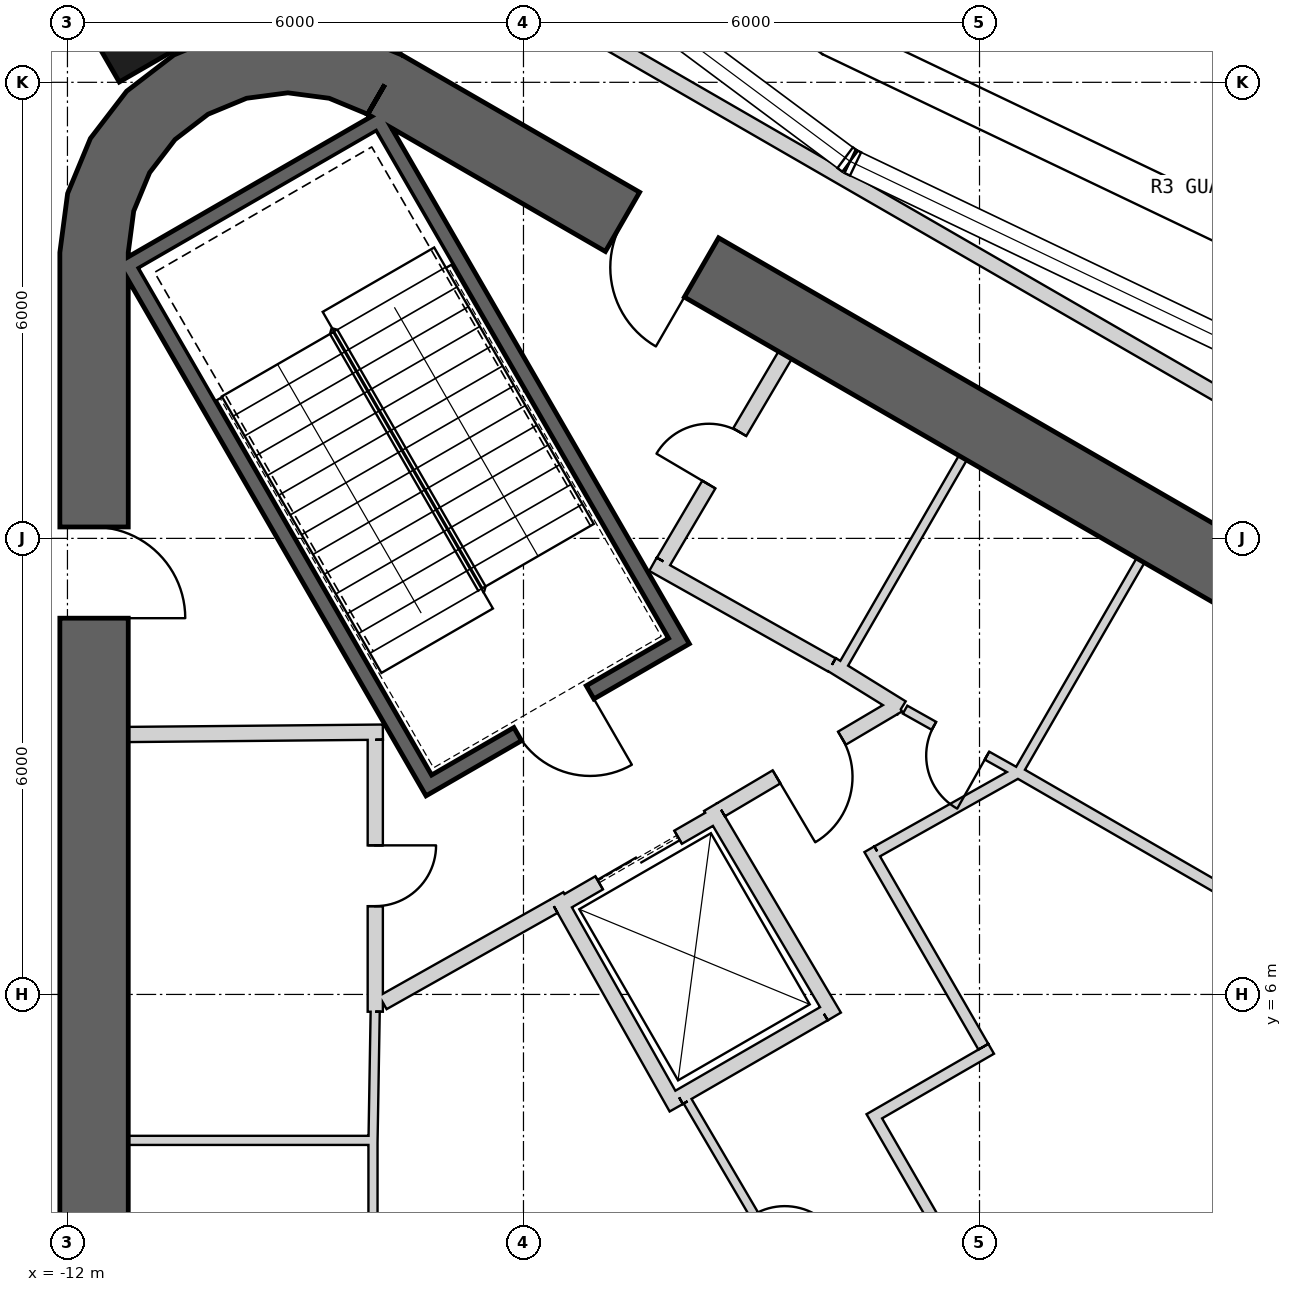
"""IFC4 building model, lengths in metres.
Left out: names, types, materials, properties, quantities, classifications, styles, units other than length and angle.
Written with IfcOpenShell. Run it as: python <this file> out.ifc"""

import sys

from ifc_helpers import new_model, si_unit, direction, frame, frame_2d, origin, origin_2d, place, context, subcontext, project, spatial, polyline, rectangle, outline, extrude, element, fill, save


model = new_model("IFC4")
c1 = context("Model", 3, precision=1e-05, world=origin(), true_north=direction((0.0, 1.0)))
c2 = subcontext(c1, "Body", "Model", "MODEL_VIEW")
j1 = project(units=[si_unit("LENGTHUNIT", "METRE"), si_unit("PLANEANGLEUNIT", "RADIAN")], contexts=[c1])
p1 = place(None, origin())
s1 = spatial("IfcSite", under=j1, at=p1, CompositionType="ELEMENT")
p2 = place(p1, origin())
s2 = spatial("IfcBuilding", under=s1, at=p2, CompositionType="ELEMENT")
p3 = place(p2, frame((0.0, 0.0, 430.3)))
s3 = spatial("IfcBuildingStorey", under=s2, at=p3, CompositionType="ELEMENT", Elevation=430.3)
p4 = place(p3, frame((-11.025, 19.097, 0.0), z_axis=(0.0, 0.0, 1.0), x_axis=(-0.5, 0.866025403784, 0.0)))
e1 = element("IfcColumn", 1, at=p4, inside=s3, PredefinedType="COLUMN", context=c2, shape_type="SweptSolid", body=[
    extrude(rectangle(XDim=1.6, YDim=1.6, at=origin_2d()), origin(), (0.0, 0.0, 1.0), 5.0),
])
p5 = place(p3, frame((19.475, 2.208, 0.0), z_axis=(0.0, 0.0, 1.0), x_axis=(-0.866028369851, 0.499994862586, 0.0)))
e2 = element("IfcWall", 2, at=p5, inside=s3, PredefinedType="SHEAR", context=c2, shape_type="SweptSolid", body=[
    extrude(rectangle(XDim=31.523, YDim=0.9, at=frame_2d((15.762, 0.0))), origin(), (0.0, 0.0, 1.0), 5.0),
])
p6 = place(p5, frame((3.612, 0.0, 0.0)))
e3 = element("IfcOpeningElement", 3, at=p6, cuts=e2, PredefinedType="OPENING", context=c2, shape_type="SweptSolid", body=[
    extrude(rectangle(XDim=1.2, YDim=2.4, at=frame_2d((0.6, 1.2))), frame((0.0, 0.46, 0.0), z_axis=(0.0, -1.0, 0.0), x_axis=(1.0, 0.0, 0.0)), (0.0, 0.0, 1.0), 0.92),
])
p7 = place(p5, frame((26.712, 0.0, 0.0)))
e4 = element("IfcOpeningElement", 4, at=p7, cuts=e2, PredefinedType="OPENING", context=c2, shape_type="SweptSolid", body=[
    extrude(rectangle(XDim=1.2, YDim=2.4, at=frame_2d((0.6, 1.2))), frame((0.0, 0.46, 0.0), z_axis=(0.0, -1.0, 0.0), x_axis=(1.0, 0.0, 0.0)), (0.0, 0.0, 1.0), 0.92),
])
p8 = place(p3, frame((-11.65, 15.762, 0.0), z_axis=(0.0, 0.0, 1.0), x_axis=(0.0, -1.0, 0.0)))
e5 = element("IfcWall", 5, at=p8, inside=s3, PredefinedType="SHEAR", context=c2, shape_type="SweptSolid", body=[
    extrude(rectangle(XDim=31.523, YDim=0.9, at=frame_2d((15.762, 0.0))), origin(), (0.0, 0.0, 1.0), 5.0),
])
p9 = place(p8, frame((3.612, 0.0, 0.0)))
e6 = element("IfcOpeningElement", 6, at=p9, cuts=e5, PredefinedType="OPENING", context=c2, shape_type="SweptSolid", body=[
    extrude(rectangle(XDim=1.2, YDim=2.4, at=frame_2d((0.6, 1.2))), frame((0.0, 0.46, 0.0), z_axis=(0.0, -1.0, 0.0), x_axis=(1.0, 0.0, 0.0)), (0.0, 0.0, 1.0), 0.92),
])
p10 = place(p8, frame((26.712, 0.0, 0.0)))
e7 = element("IfcOpeningElement", 7, at=p10, cuts=e5, PredefinedType="OPENING", context=c2, shape_type="SweptSolid", body=[
    extrude(rectangle(XDim=1.2, YDim=2.4, at=frame_2d((0.6, 1.2))), frame((0.0, 0.46, 0.0), z_axis=(0.0, -1.0, 0.0), x_axis=(1.0, 0.0, 0.0)), (0.0, 0.0, 1.0), 0.92),
])
p11 = place(p3, origin())
e8 = element("IfcWall", 8, at=p11, inside=s3, PredefinedType="SHEAR", context=c2, shape_type="SweptSolid", body=[
    extrude(outline(polyline([(-7.6, 18.36), (-8.323, 18.659), (-9.1, 18.762), (-9.876, 18.659), (-10.6, 18.36), (-11.221, 17.883), (-11.698, 17.262), (-11.998, 16.538), (-12.1, 15.762), (-11.2, 15.762), (-11.128, 16.305), (-10.919, 16.812), (-10.585, 17.247), (-10.15, 17.58), (-9.644, 17.79), (-9.1, 17.862), (-8.556, 17.79), (-8.05, 17.58), (-7.6, 18.36)])), origin(), (0.0, 0.0, 1.0), 5.0),
])
p12 = place(p3, frame((-11.245, 15.678, -0.25), z_axis=(0.0, 0.0, 1.0), x_axis=(0.499977274689, -0.866038523851, 0.0)))
e9 = element("IfcWall", 9, at=p12, inside=s3, PredefinedType="SHEAR", context=c2, shape_type="SweptSolid", body=[
    extrude(rectangle(XDim=8.1, YDim=0.2, at=frame_2d((4.05, 0.0))), origin(), (0.0, 0.0, 1.0), 5.0),
])
p13 = place(p3, frame((-7.818, 17.541, -0.25), z_axis=(0.0, 0.0, 1.0), x_axis=(-0.866044365799, -0.499967155389, 0.0)))
e10 = element("IfcWall", 10, at=p13, inside=s3, PredefinedType="SHEAR", context=c2, shape_type="SweptSolid", body=[
    extrude(rectangle(XDim=3.8, YDim=0.2, at=frame_2d((1.9, 0.0))), origin(), (0.0, 0.0, 1.0), 5.0),
])
p14 = place(p3, frame((-7.854, 17.405, -0.25), z_axis=(0.0, 0.0, 1.0), x_axis=(0.499997992926, -0.866026562566, 0.0)))
e11 = element("IfcWall", 11, at=p14, inside=s3, PredefinedType="SHEAR", context=c2, shape_type="SweptSolid", body=[
    extrude(rectangle(XDim=7.9, YDim=0.2, at=frame_2d((3.95, 0.0))), origin(), (0.0, 0.0, 1.0), 5.0),
])
p15 = place(p3, frame((-7.159, 8.8, -0.25), z_axis=(0.0, 0.0, 1.0), x_axis=(0.866047807691, 0.499961193289, 0.0)))
e12 = element("IfcWall", 12, at=p15, inside=s3, PredefinedType="SHEAR", context=c2, shape_type="SweptSolid", body=[
    extrude(rectangle(XDim=3.6, YDim=0.2, at=frame_2d((1.8, 0.0))), origin(), (0.0, 0.0, 1.0), 5.0),
])
p16 = place(p15, frame((1.25, 0.0, 0.25)))
e13 = element("IfcOpeningElement", 13, at=p16, cuts=e12, PredefinedType="OPENING", context=c2, shape_type="SweptSolid", body=[
    extrude(rectangle(XDim=1.1, YDim=2.1, at=frame_2d((0.55, 1.05))), frame((0.0, 0.11, 0.0), z_axis=(0.0, -1.0, 0.0), x_axis=(1.0, 0.0, 0.0)), (0.0, 0.0, 1.0), 0.22),
])
p17 = place(p3, frame((-5.524, 7.168, 0.0), z_axis=(0.0, 0.0, 1.0), x_axis=(0.866024647952, 0.500001309137, 0.0)))
e14 = element("IfcWall", 14, at=p17, inside=s3, PredefinedType="PLUMBINGWALL", context=c2, shape_type="SweptSolid", body=[
    extrude(rectangle(XDim=2.4, YDim=0.2, at=frame_2d((1.2, 0.0))), origin(), (0.0, 0.0, 1.0), 4.75),
])
p18 = place(p17, frame((0.6, 0.0, 0.0)))
e15 = element("IfcOpeningElement", 15, at=p18, cuts=e14, PredefinedType="OPENING", context=c2, shape_type="SweptSolid", body=[
    extrude(rectangle(XDim=1.2, YDim=2.4, at=frame_2d((0.6, 1.2))), frame((0.0, 0.11, 0.0), z_axis=(0.0, -1.0, 0.0), x_axis=(1.0, 0.0, 0.0)), (0.0, 0.0, 1.0), 0.22),
])
p19 = place(p3, frame((-2.047, 5.746, 0.0), z_axis=(0.0, 0.0, 1.0), x_axis=(-0.86605622881, -0.499946605688, 0.0)))
e16 = element("IfcWall", 16, at=p19, inside=s3, PredefinedType="PLUMBINGWALL", context=c2, shape_type="SweptSolid", body=[
    extrude(rectangle(XDim=2.2, YDim=0.2, at=frame_2d((1.1, 0.0))), origin(), (0.0, 0.0, 1.0), 4.75),
])
p20 = place(p3, frame((-3.99, 4.509, 0.0), z_axis=(0.0, 0.0, 1.0), x_axis=(-0.491358283181, 0.870957540612, 0.0)))
e17 = element("IfcWall", 17, at=p20, inside=s3, PredefinedType="PLUMBINGWALL", context=c2, shape_type="SweptSolid", body=[
    extrude(rectangle(XDim=3.2, YDim=0.2, at=frame_2d((1.6, 0.0))), origin(), (0.0, 0.0, 1.0), 4.75),
])
p21 = place(p3, frame((-3.538, 8.465, 0.0), z_axis=(0.0, 0.0, 1.0), x_axis=(0.508616218331, -0.860993346345, 0.0)))
e18 = element("IfcWall", 18, at=p21, inside=s3, PredefinedType="PLUMBINGWALL", context=c2, shape_type="SweptSolid", body=[
    extrude(rectangle(XDim=3.2, YDim=0.2, at=frame_2d((1.6, 0.0))), origin(), (0.0, 0.0, 1.0), 4.75),
])
p22 = place(p3, frame((-7.95, 4.08, 0.0), z_axis=(0.0, 0.0, 1.0), x_axis=(-1.0, 0.0, 0.0)))
e19 = element("IfcWall", 19, at=p22, inside=s3, PredefinedType="PARTITIONING", context=c2, shape_type="SweptSolid", body=[
    extrude(rectangle(XDim=3.25, YDim=0.12, at=frame_2d((1.625, 0.0))), origin(), (0.0, 0.0, 1.0), 4.75),
])
p23 = place(p3, frame((-7.85, 9.451, 0.0), z_axis=(0.0, 0.0, 1.0), x_axis=(-0.999957167047, -0.009255488683, 0.0)))
e20 = element("IfcWall", 20, at=p23, inside=s3, PredefinedType="PARTITIONING", context=c2, shape_type="SweptSolid", body=[
    extrude(rectangle(XDim=3.35, YDim=0.2, at=frame_2d((1.675, 0.0))), origin(), (0.0, 0.0, 1.0), 4.75),
])
p24 = place(p3, frame((-7.95, 5.772, 0.0), z_axis=(0.0, 0.0, 1.0), x_axis=(0.0, 1.0, 0.0)))
e21 = element("IfcWall", 21, at=p24, inside=s3, PredefinedType="PARTITIONING", context=c2, shape_type="SweptSolid", body=[
    extrude(rectangle(XDim=3.578, YDim=0.2, at=frame_2d((1.789, 0.0))), origin(), (0.0, 0.0, 1.0), 4.75),
])
p25 = place(p24, frame((1.389, 0.0, 0.0)))
e22 = element("IfcOpeningElement", 22, at=p25, cuts=e21, PredefinedType="OPENING", context=c2, shape_type="SweptSolid", body=[
    extrude(rectangle(XDim=0.8, YDim=2.1, at=frame_2d((0.4, 1.05))), frame((0.0, 0.11, 0.0), z_axis=(0.0, -1.0, 0.0), x_axis=(1.0, 0.0, 0.0)), (0.0, 0.0, 1.0), 0.22),
])
p26 = place(p3, frame((-7.951, 5.772, 0.0), z_axis=(0.0, 0.0, 1.0), x_axis=(-0.016723387416, -0.999860154378, 0.0)))
e23 = element("IfcWall", 23, at=p26, inside=s3, PredefinedType="PARTITIONING", context=c2, shape_type="SweptSolid", body=[
    extrude(rectangle(XDim=1.723, YDim=0.12, at=frame_2d((0.861, 0.0))), origin(), (0.0, 0.0, 1.0), 4.75),
])
p27 = place(p3, frame((-7.98, 4.05, 0.0), z_axis=(0.0, 0.0, 1.0), x_axis=(0.0, -1.0, 0.0)))
e24 = element("IfcWall", 24, at=p27, inside=s3, PredefinedType="PARTITIONING", context=c2, shape_type="SweptSolid", body=[
    extrude(rectangle(XDim=8.1, YDim=0.12, at=frame_2d((4.05, 0.0))), origin(), (0.0, 0.0, 1.0), 4.75),
])
p28 = place(p27, frame((3.65, 0.0, 0.0)))
e25 = element("IfcOpeningElement", 25, at=p28, cuts=e24, PredefinedType="OPENING", context=c2, shape_type="SweptSolid", body=[
    extrude(rectangle(XDim=0.8, YDim=2.1, at=frame_2d((0.4, 1.05))), frame((0.0, 0.07, 0.0), z_axis=(0.0, -1.0, 0.0), x_axis=(1.0, 0.0, 0.0)), (0.0, 0.0, 1.0), 0.14),
])
p29 = place(p3, frame((2.119, 11.709, 0.0), z_axis=(0.0, 0.0, 1.0), x_axis=(-0.500017246033, -0.866015446554, 0.0)))
e26 = element("IfcWall", 26, at=p29, inside=s3, PredefinedType="PARTITIONING", context=c2, shape_type="SweptSolid", body=[
    extrude(rectangle(XDim=3.25, YDim=0.12, at=frame_2d((1.625, 0.0))), origin(), (0.0, 0.0, 1.0), 4.75),
])
p30 = place(p3, frame((7.497, 4.886, 0.0), z_axis=(0.0, 0.0, 1.0), x_axis=(-0.866030989016, 0.499990325971, 0.0)))
e27 = element("IfcWall", 27, at=p30, inside=s3, PredefinedType="PLUMBINGWALL", context=c2, shape_type="SweptSolid", body=[
    extrude(rectangle(XDim=8.1, YDim=0.15, at=frame_2d((4.05, 0.0))), origin(), (0.0, 0.0, 1.0), 4.75),
])
p31 = place(p3, frame((-0.22, 13.06, 0.0), z_axis=(0.0, 0.0, 1.0), x_axis=(-0.499984717929, -0.866034226713, 0.0)))
e28 = element("IfcWall", 28, at=p31, inside=s3, PredefinedType="PARTITIONING", context=c2, shape_type="SweptSolid", body=[
    extrude(rectangle(XDim=3.25, YDim=0.12, at=frame_2d((1.625, 0.0))), origin(), (0.0, 0.0, 1.0), 4.75),
])
p32 = place(p3, frame((-1.941, 10.339, 0.0), z_axis=(0.0, 0.0, 1.0), x_axis=(0.850216889117, -0.526432561171, 0.0)))
e29 = element("IfcWall", 29, at=p32, inside=s3, PredefinedType="PARTITIONING", context=c2, shape_type="SweptSolid", body=[
    extrude(rectangle(XDim=1.078, YDim=0.2, at=frame_2d((0.539, 0.0))), origin(), (0.0, 0.0, 1.0), 4.75),
])
p33 = place(p3, frame((-0.979, 9.747, 0.0), z_axis=(0.0, 0.0, 1.0), x_axis=(0.871957532922, -0.489581515972, 0.0)))
e30 = element("IfcWall", 30, at=p33, inside=s3, PredefinedType="PARTITIONING", context=c2, shape_type="SweptSolid", body=[
    extrude(rectangle(XDim=1.672, YDim=0.12, at=frame_2d((0.836, 0.0))), origin(), (0.0, 0.0, 1.0), 4.75),
])
p34 = place(p33, frame((0.436, 0.0, 0.0)))
e31 = element("IfcOpeningElement", 31, at=p34, cuts=e30, PredefinedType="OPENING", context=c2, shape_type="SweptSolid", body=[
    extrude(rectangle(XDim=0.8, YDim=2.1, at=frame_2d((0.4, 1.05))), frame((0.0, 0.07, 0.0), z_axis=(0.0, -1.0, 0.0), x_axis=(1.0, 0.0, 0.0)), (0.0, 0.0, 1.0), 0.14),
])
p35 = place(p3, frame((-4.296, 11.659, 0.0), z_axis=(0.0, 0.0, 1.0), x_axis=(0.871534483978, -0.490334215854, 0.0)))
e32 = element("IfcWall", 32, at=p35, inside=s3, PredefinedType="PARTITIONING", context=c2, shape_type="SweptSolid", body=[
    extrude(rectangle(XDim=2.7, YDim=0.2, at=frame_2d((1.35, 0.0))), origin(), (0.0, 0.0, 1.0), 4.75),
])
p36 = place(p3, frame((-2.558, 14.409, 0.0), z_axis=(0.0, 0.0, 1.0), x_axis=(-0.508018930956, -0.861345903683, 0.0)))
e33 = element("IfcWall", 33, at=p36, inside=s3, PredefinedType="PARTITIONING", context=c2, shape_type="SweptSolid", body=[
    extrude(rectangle(XDim=3.15, YDim=0.2, at=frame_2d((1.575, 0.0))), origin(), (0.0, 0.0, 1.0), 4.75),
])
p37 = place(p36, frame((1.175, 0.0, 0.0)))
e34 = element("IfcOpeningElement", 34, at=p37, cuts=e33, PredefinedType="OPENING", context=c2, shape_type="SweptSolid", body=[
    extrude(rectangle(XDim=0.8, YDim=2.1, at=frame_2d((0.4, 1.05))), frame((0.0, 0.11, 0.0), z_axis=(0.0, -1.0, 0.0), x_axis=(1.0, 0.0, 0.0)), (0.0, 0.0, 1.0), 0.22),
])
p38 = place(p3, frame((-5.6, 7.16, 0.0), z_axis=(0.0, 0.0, 1.0), x_axis=(-0.871350695252, -0.490660744185, 0.0)))
e35 = element("IfcWall", 35, at=p38, inside=s3, PredefinedType="PARTITIONING", context=c2, shape_type="SweptSolid", body=[
    extrude(rectangle(XDim=2.582, YDim=0.2, at=frame_2d((1.291, 0.0))), origin(), (0.0, 0.0, 1.0), 4.75),
])
p39 = place(p3, frame((-1.07, 9.809, 0.0), z_axis=(0.0, 0.0, 1.0), x_axis=(-0.860603293832, -0.509275927808, 0.0)))
e36 = element("IfcWall", 36, at=p39, inside=s3, PredefinedType="PARTITIONING", context=c2, shape_type="SweptSolid", body=[
    extrude(rectangle(XDim=2.708, YDim=0.2, at=frame_2d((1.354, 0.0))), origin(), (0.0, 0.0, 1.0), 4.75),
])
p40 = place(p39, frame((0.86, 0.0, 0.0)))
e37 = element("IfcOpeningElement", 37, at=p40, cuts=e36, PredefinedType="OPENING", context=c2, shape_type="SweptSolid", body=[
    extrude(rectangle(XDim=1.0, YDim=2.1, at=frame_2d((0.5, 1.05))), frame((0.0, 0.11, 0.0), z_axis=(0.0, -1.0, 0.0), x_axis=(1.0, 0.0, 0.0)), (0.0, 0.0, 1.0), 0.22),
])
p41 = place(p3, frame((-1.637, 0.837, 0.0), z_axis=(0.0, 0.0, 1.0), x_axis=(-0.505858978646, 0.862616191433, 0.0)))
e38 = element("IfcWall", 38, at=p41, inside=s3, PredefinedType="PARTITIONING", context=c2, shape_type="SweptSolid", body=[
    extrude(rectangle(XDim=4.357, YDim=0.12, at=frame_2d((2.179, 0.0))), origin(), (0.0, 0.0, 1.0), 4.75),
])
p42 = place(p41, frame((1.83, 0.0, 0.0)))
e39 = element("IfcOpeningElement", 39, at=p42, cuts=e38, PredefinedType="OPENING", context=c2, shape_type="SweptSolid", body=[
    extrude(rectangle(XDim=0.8, YDim=2.1, at=frame_2d((0.4, 1.05))), frame((0.0, 0.07, 0.0), z_axis=(0.0, -1.0, 0.0), x_axis=(1.0, 0.0, 0.0)), (0.0, 0.0, 1.0), 0.14),
])
p43 = place(p3, frame((-1.421, 4.462, 0.0), z_axis=(0.0, 0.0, 1.0), x_axis=(0.499969679245, -0.866042908773, 0.0)))
e40 = element("IfcWall", 40, at=p43, inside=s3, PredefinedType="PLUMBINGWALL", context=c2, shape_type="SweptSolid", body=[
    extrude(rectangle(XDim=2.906, YDim=0.15, at=frame_2d((1.453, 0.0))), origin(), (0.0, 0.0, 1.0), 4.75),
])
p44 = place(p3, frame((0.153, 5.285, 0.0), z_axis=(0.0, 0.0, 1.0), x_axis=(-0.866025371046, -0.500000056704, 0.0)))
e41 = element("IfcWall", 41, at=p44, inside=s3, PredefinedType="PLUMBINGWALL", context=c2, shape_type="SweptSolid", body=[
    extrude(rectangle(XDim=1.7, YDim=0.15, at=frame_2d((0.85, 0.0))), origin(), (0.0, 0.0, 1.0), 4.75),
])
p45 = place(p3, frame((-1.449, 7.91, 0.0), z_axis=(0.0, 0.0, 1.0), x_axis=(0.499990139034, -0.866031096941, 0.0)))
e42 = element("IfcWall", 42, at=p45, inside=s3, PredefinedType="PLUMBINGWALL", context=c2, shape_type="SweptSolid", body=[
    extrude(rectangle(XDim=3.0, YDim=0.15, at=frame_2d((1.5, 0.0))), origin(), (0.0, 0.0, 1.0), 4.75),
])
p46 = place(p3, frame((0.475, 8.905, 0.0), z_axis=(0.0, 0.0, 1.0), x_axis=(-0.871843752163, -0.489784107353, 0.0)))
e43 = element("IfcWall", 43, at=p46, inside=s3, PredefinedType="PLUMBINGWALL", context=c2, shape_type="SweptSolid", body=[
    extrude(rectangle(XDim=2.09, YDim=0.15, at=frame_2d((1.045, 0.0))), origin(), (0.0, 0.0, 1.0), 4.75),
])
p47 = place(p3, frame((20.834, 3.675, 0.0), z_axis=(0.0, 0.0, 1.0), x_axis=(-0.866028536494, 0.499994573949, 0.0)))
e44 = element("IfcWall", 44, at=p47, inside=s3, PredefinedType="PARTITIONING", context=c2, shape_type="SweptSolid", body=[
    extrude(rectangle(XDim=32.411, YDim=0.2, at=frame_2d((16.206, 0.0))), origin(), (0.0, 0.0, 1.0), 4.75),
])
p48 = place(p47, frame((7.7, 0.0, 0.0)))
e45 = element("IfcOpeningElement", 45, at=p48, cuts=e44, PredefinedType="OPENING", context=c2, shape_type="SweptSolid", body=[
    extrude(rectangle(XDim=1.0, YDim=2.1, at=frame_2d((0.5, 1.05))), frame((0.0, 0.11, 0.0), z_axis=(0.0, -1.0, 0.0), x_axis=(1.0, 0.0, 0.0)), (0.0, 0.0, 1.0), 0.22),
])
p49 = place(p47, frame((18.006, 0.0, 0.0)))
e46 = element("IfcOpeningElement", 46, at=p49, cuts=e44, PredefinedType="OPENING", context=c2, shape_type="SweptSolid", body=[
    extrude(rectangle(XDim=1.0, YDim=2.1, at=frame_2d((0.5, 1.05))), frame((0.0, 0.11, 0.0), z_axis=(0.0, -1.0, 0.0), x_axis=(1.0, 0.0, 0.0)), (0.0, 0.0, 1.0), 0.22),
])
p50 = place(p16, origin())
e47 = element("IfcDoor", 47, at=p50, inside=s3, OperationType="SINGLE_SWING_RIGHT", PredefinedType="USERDEFINED", context=c2, shape_type="SweptSolid", body=[
    extrude(rectangle(XDim=1.1, YDim=2.1, at=frame_2d((0.55, 1.05))), frame((0.0, 0.025, 0.0), z_axis=(0.0, -1.0, 0.0), x_axis=(1.0, 0.0, 0.0)), (0.0, 0.0, 1.0), 0.05),
])
fill(e13, e47)
p51 = place(p40, origin())
e48 = element("IfcDoor", 48, at=p51, inside=s3, OperationType="SINGLE_SWING_RIGHT", PredefinedType="USERDEFINED", context=c2, shape_type="SweptSolid", body=[
    extrude(rectangle(XDim=1.0, YDim=2.1, at=frame_2d((0.5, 1.05))), frame((0.0, 0.025, 0.0), z_axis=(0.0, -1.0, 0.0), x_axis=(1.0, 0.0, 0.0)), (0.0, 0.0, 1.0), 0.05),
])
fill(e37, e48)
p52 = place(p18, origin())
e49 = element("IfcDoor", 49, at=p52, inside=s3, OperationType="SLIDING_TO_LEFT", PredefinedType="USERDEFINED", context=c2, shape_type="SweptSolid", body=[
    extrude(rectangle(XDim=1.2, YDim=2.4, at=frame_2d((0.6, 1.2))), frame((0.0, 0.025, 0.0), z_axis=(0.0, -1.0, 0.0), x_axis=(1.0, 0.0, 0.0)), (0.0, 0.0, 1.0), 0.05),
])
fill(e15, e49)
p53 = place(p25, origin())
e50 = element("IfcDoor", 50, at=p53, inside=s3, OperationType="SINGLE_SWING_RIGHT", PredefinedType="USERDEFINED", context=c2, shape_type="SweptSolid", body=[
    extrude(rectangle(XDim=0.8, YDim=2.1, at=frame_2d((0.4, 1.05))), frame((0.0, 0.025, 0.0), z_axis=(0.0, -1.0, 0.0), x_axis=(1.0, 0.0, 0.0)), (0.0, 0.0, 1.0), 0.05),
])
fill(e22, e50)
p54 = place(p34, origin())
e51 = element("IfcDoor", 51, at=p54, inside=s3, OperationType="SINGLE_SWING_RIGHT", PredefinedType="USERDEFINED", context=c2, shape_type="SweptSolid", body=[
    extrude(rectangle(XDim=0.8, YDim=2.1, at=frame_2d((0.4, 1.05))), frame((0.0, 0.025, 0.0), z_axis=(0.0, -1.0, 0.0), x_axis=(1.0, 0.0, 0.0)), (0.0, 0.0, 1.0), 0.05),
])
fill(e31, e51)
p55 = place(p37, origin())
e52 = element("IfcDoor", 52, at=p55, inside=s3, OperationType="SINGLE_SWING_RIGHT", PredefinedType="USERDEFINED", context=c2, shape_type="SweptSolid", body=[
    extrude(rectangle(XDim=0.8, YDim=2.1, at=frame_2d((0.4, 1.05))), frame((0.0, 0.025, 0.0), z_axis=(0.0, -1.0, 0.0), x_axis=(1.0, 0.0, 0.0)), (0.0, 0.0, 1.0), 0.05),
])
fill(e34, e52)
p56 = place(p7, origin())
e53 = element("IfcDoor", 53, at=p56, inside=s3, OperationType="SINGLE_SWING_LEFT", PredefinedType="USERDEFINED", context=c2, shape_type="SweptSolid", body=[
    extrude(rectangle(XDim=1.2, YDim=2.4, at=frame_2d((0.6, 1.2))), frame((0.0, 0.025, 0.0), z_axis=(0.0, -1.0, 0.0), x_axis=(1.0, 0.0, 0.0)), (0.0, 0.0, 1.0), 0.05),
])
fill(e4, e53)
p57 = place(p9, origin())
e54 = element("IfcDoor", 54, at=p57, inside=s3, OperationType="SINGLE_SWING_RIGHT", PredefinedType="USERDEFINED", context=c2, shape_type="SweptSolid", body=[
    extrude(rectangle(XDim=1.2, YDim=2.4, at=frame_2d((0.6, 1.2))), frame((0.0, 0.025, 0.0), z_axis=(0.0, -1.0, 0.0), x_axis=(1.0, 0.0, 0.0)), (0.0, 0.0, 1.0), 0.05),
])
fill(e6, e54)
save(model, sys.argv[1])
